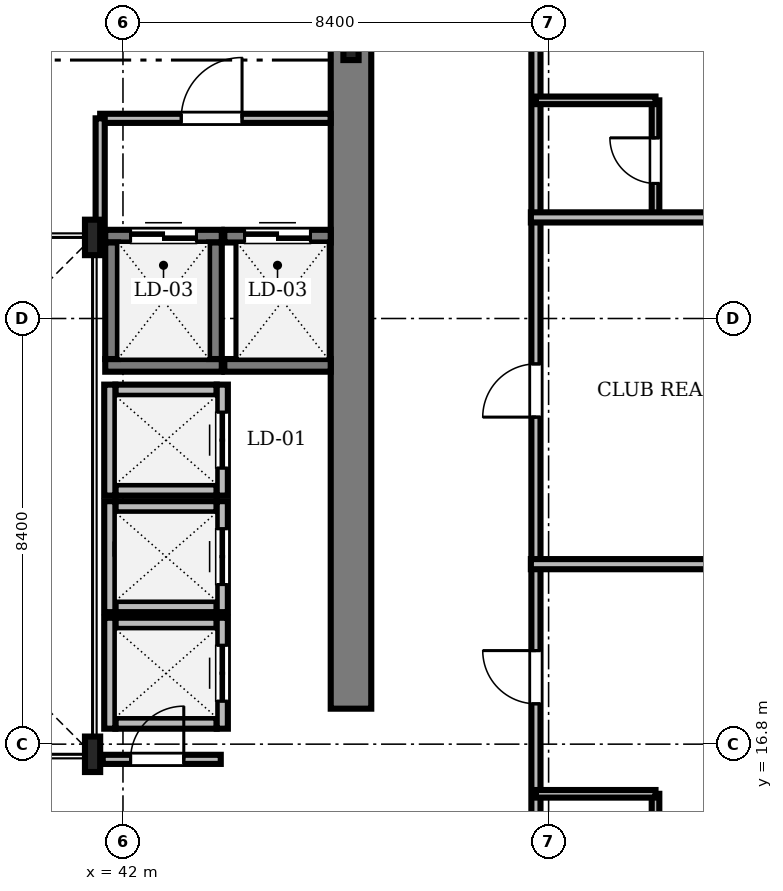
"""IFC4 building model, lengths in metres.
Left out: names, types, materials, properties, quantities, classifications, styles, units other than length and angle.
Written with IfcOpenShell. Run it as: python <this file> out.ifc"""

import sys

from ifc_helpers import new_model, si_unit, direction, frame, frame_2d, origin, origin_2d, place, context, subcontext, project, spatial, rectangle, i_section, extrude, source, transform, mapped, element, fill, save


model = new_model("IFC4")
c1 = context("Model", 3, precision=1e-05, world=origin(), true_north=direction((0.0, 1.0)))
c2 = subcontext(c1, "Body", "Model", "MODEL_VIEW")
j1 = project(units=[si_unit("LENGTHUNIT", "METRE"), si_unit("PLANEANGLEUNIT", "RADIAN")], contexts=[c1])
p1 = place(None, origin())
s1 = spatial("IfcSite", under=j1, at=p1, CompositionType="ELEMENT")
p2 = place(p1, origin())
s2 = spatial("IfcBuilding", under=s1, at=p2, CompositionType="ELEMENT")
p3 = place(p2, frame((0.0, 0.0, 181.0)))
s3 = spatial("IfcBuildingStorey", under=s2, at=p3, CompositionType="ELEMENT", Elevation=181.0)
m1 = source(origin(), c2, "Body", "SweptSolid", [
    extrude(rectangle(XDim=13.15, YDim=0.8, at=frame_2d((6.575, 0.0))), origin(), (0.0, 0.0, 1.0), 3.58),
])
p4 = place(p3, frame((46.5, 17.5, 0.0), z_axis=(0.0, 0.0, 1.0), x_axis=(0.0, 1.0, 0.0)))
e1 = element("IfcWall", 1, at=p4, inside=s3, PredefinedType="SHEAR", context=c2, shape_type="MappedRepresentation", body=[
    mapped(m1, transform((0.0, 0.0, 0.0), scale=1.0)),
])
m2 = source(origin(), c2, "Body", "SweptSolid", [
    extrude(i_section(OverallWidth=0.3, OverallDepth=0.7, WebThickness=0.017, FlangeThickness=0.032, FilletRadius=0.027, at=origin_2d()), origin(), (0.0, 0.0, 1.0), 3.58),
])
for number, where, z_axis, x_axis in (
    (2, (41.4, 16.6, 0.0), (0.0, 0.0, 1.0), (1.0, 0.0, 0.0)),
    (3, (41.4, 26.8, 0.0), (0.0, 0.0, 1.0), (1.0, 0.0, 0.0)),
    (4, (46.5, 30.65, 0.0), (0.0, 0.0, 1.0), (1.0, 0.0, 0.0)),
):
    element("IfcColumn", number, at=place(p3, frame(where, z_axis=z_axis, x_axis=x_axis)), inside=s3, PredefinedType="COLUMN", context=c2, shape_type="MappedRepresentation", body=[
        mapped(m2, transform((0.0, 0.0, 0.0), scale=1.0)),
    ])
m3 = source(origin(), c2, "Body", "SweptSolid", [
    extrude(rectangle(XDim=2.0, YDim=0.22, at=frame_2d((1.0, 0.0))), origin(), (0.0, 0.0, 1.0), 3.58),
])
for number, where, z_axis, x_axis in (
    (5, (41.85, 21.815, 0.0), (0.0, 0.0, 1.0), (1.0, 0.0, 0.0)),
    (6, (41.85, 23.785, 0.0), (0.0, 0.0, 1.0), (1.0, 0.0, 0.0)),
):
    element("IfcWall", number, at=place(p3, frame(where, z_axis=z_axis, x_axis=x_axis)), inside=s3, PredefinedType="SOLIDWALL", context=c2, shape_type="MappedRepresentation", body=[
        mapped(m3, transform((0.0, 0.0, 0.0), scale=1.0)),
    ])
m4 = source(origin(), c2, "Body", "SweptSolid", [
    extrude(rectangle(XDim=2.19, YDim=0.22, at=frame_2d((1.095, 0.0))), origin(), (0.0, 0.0, 1.0), 3.58),
])
p5 = place(p3, frame((41.74, 21.705, 0.0), z_axis=(0.0, 0.0, 1.0), x_axis=(0.0, 1.0, 0.0)))
e7 = element("IfcWall", 7, at=p5, inside=s3, PredefinedType="SOLIDWALL", context=c2, shape_type="MappedRepresentation", body=[
    mapped(m4, transform((0.0, 0.0, 0.0), scale=1.0)),
])
p6 = place(p3, frame((43.96, 21.705, 0.0), z_axis=(0.0, 0.0, 1.0), x_axis=(0.0, 1.0, 0.0)))
e8 = element("IfcWall", 8, at=p6, inside=s3, PredefinedType="SOLIDWALL", context=c2, shape_type="MappedRepresentation", body=[
    mapped(m4, transform((0.0, 0.0, 0.0), scale=1.0)),
])
m5 = source(origin(), c2, "Body", "SweptSolid", [
    extrude(rectangle(XDim=1.1, YDim=2.2, at=frame_2d((0.55, 1.1))), frame((0.0, 0.12, 0.0), z_axis=(0.0, -1.0, 0.0), x_axis=(1.0, 0.0, 0.0)), (0.0, 0.0, 1.0), 0.24),
])
p7 = place(p6, frame((0.545, 0.0, 0.0)))
e9 = element("IfcOpeningElement", 9, at=p7, cuts=e8, PredefinedType="OPENING", context=c2, shape_type="MappedRepresentation", body=[
    mapped(m5, transform((0.0, 0.0, 0.0), scale=1.0)),
])
for number, where, z_axis, x_axis in (
    (10, (41.85, 19.515, 0.0), (0.0, 0.0, 1.0), (1.0, 0.0, 0.0)),
    (11, (41.85, 21.485, 0.0), (0.0, 0.0, 1.0), (1.0, 0.0, 0.0)),
):
    element("IfcWall", number, at=place(p3, frame(where, z_axis=z_axis, x_axis=x_axis)), inside=s3, PredefinedType="SOLIDWALL", context=c2, shape_type="MappedRepresentation", body=[
        mapped(m3, transform((0.0, 0.0, 0.0), scale=1.0)),
    ])
p8 = place(p3, frame((41.74, 19.405, 0.0), z_axis=(0.0, 0.0, 1.0), x_axis=(0.0, 1.0, 0.0)))
e12 = element("IfcWall", 12, at=p8, inside=s3, PredefinedType="SOLIDWALL", context=c2, shape_type="MappedRepresentation", body=[
    mapped(m4, transform((0.0, 0.0, 0.0), scale=1.0)),
])
p9 = place(p3, frame((43.96, 19.405, 0.0), z_axis=(0.0, 0.0, 1.0), x_axis=(0.0, 1.0, 0.0)))
e13 = element("IfcWall", 13, at=p9, inside=s3, PredefinedType="SOLIDWALL", context=c2, shape_type="MappedRepresentation", body=[
    mapped(m4, transform((0.0, 0.0, 0.0), scale=1.0)),
])
p10 = place(p9, frame((0.545, 0.0, 0.0)))
e14 = element("IfcOpeningElement", 14, at=p10, cuts=e13, PredefinedType="OPENING", context=c2, shape_type="MappedRepresentation", body=[
    mapped(m5, transform((0.0, 0.0, 0.0), scale=1.0)),
])
for number, where, z_axis, x_axis in (
    (15, (41.85, 17.215, 0.0), (0.0, 0.0, 1.0), (1.0, 0.0, 0.0)),
    (16, (41.85, 19.185, 0.0), (0.0, 0.0, 1.0), (1.0, 0.0, 0.0)),
):
    element("IfcWall", number, at=place(p3, frame(where, z_axis=z_axis, x_axis=x_axis)), inside=s3, PredefinedType="SOLIDWALL", context=c2, shape_type="MappedRepresentation", body=[
        mapped(m3, transform((0.0, 0.0, 0.0), scale=1.0)),
    ])
p11 = place(p3, frame((41.74, 17.105, 0.0), z_axis=(0.0, 0.0, 1.0), x_axis=(0.0, 1.0, 0.0)))
e17 = element("IfcWall", 17, at=p11, inside=s3, PredefinedType="SOLIDWALL", context=c2, shape_type="MappedRepresentation", body=[
    mapped(m4, transform((0.0, 0.0, 0.0), scale=1.0)),
])
p12 = place(p3, frame((43.96, 17.105, 0.0), z_axis=(0.0, 0.0, 1.0), x_axis=(0.0, 1.0, 0.0)))
e18 = element("IfcWall", 18, at=p12, inside=s3, PredefinedType="SOLIDWALL", context=c2, shape_type="MappedRepresentation", body=[
    mapped(m4, transform((0.0, 0.0, 0.0), scale=1.0)),
])
p13 = place(p12, frame((0.545, 0.0, 0.0)))
e19 = element("IfcOpeningElement", 19, at=p13, cuts=e18, PredefinedType="OPENING", context=c2, shape_type="MappedRepresentation", body=[
    mapped(m5, transform((0.0, 0.0, 0.0), scale=1.0)),
])
m6 = source(origin(), c2, "Body", "SweptSolid", [
    extrude(rectangle(XDim=2.3, YDim=0.25, at=frame_2d((1.15, 0.0))), origin(), (0.0, 0.0, 1.0), 3.58),
])
p14 = place(p3, frame((41.65, 24.275, 0.0), z_axis=(0.0, 0.0, 1.0), x_axis=(1.0, 0.0, 0.0)))
e20 = element("IfcWall", 20, at=p14, inside=s3, PredefinedType="SOLIDWALL", context=c2, shape_type="MappedRepresentation", body=[
    mapped(m6, transform((0.0, 0.0, 0.0), scale=1.0)),
])
p15 = place(p3, frame((41.65, 26.825, 0.0), z_axis=(0.0, 0.0, 1.0), x_axis=(1.0, 0.0, 0.0)))
e21 = element("IfcWall", 21, at=p15, inside=s3, PredefinedType="SOLIDWALL", context=c2, shape_type="MappedRepresentation", body=[
    mapped(m6, transform((0.0, 0.0, 0.0), scale=1.0)),
])
m7 = source(origin(), c2, "Body", "SweptSolid", [
    extrude(rectangle(XDim=1.3, YDim=2.3, at=frame_2d((0.65, 1.15))), frame((0.0, 0.135, 0.0), z_axis=(0.0, -1.0, 0.0), x_axis=(1.0, 0.0, 0.0)), (0.0, 0.0, 1.0), 0.27),
])
p16 = place(p15, frame((0.5, 0.0, 0.0)))
e22 = element("IfcOpeningElement", 22, at=p16, cuts=e21, PredefinedType="OPENING", context=c2, shape_type="MappedRepresentation", body=[
    mapped(m7, transform((0.0, 0.0, 0.0), scale=1.0)),
])
for number, where, z_axis, x_axis in (
    (23, (41.775, 24.4, 0.0), (0.0, 0.0, 1.0), (0.0, 1.0, 0.0)),
    (24, (43.825, 24.4, 0.0), (0.0, 0.0, 1.0), (0.0, 1.0, 0.0)),
):
    element("IfcWall", number, at=place(p3, frame(where, z_axis=z_axis, x_axis=x_axis)), inside=s3, PredefinedType="SOLIDWALL", context=c2, shape_type="MappedRepresentation", body=[
        mapped(m6, transform((0.0, 0.0, 0.0), scale=1.0)),
    ])
m8 = source(origin(), c2, "Body", "SweptSolid", [
    extrude(rectangle(XDim=2.1, YDim=0.25, at=frame_2d((1.05, 0.0))), origin(), (0.0, 0.0, 1.0), 3.58),
])
p17 = place(p3, frame((44.0, 24.275, 0.0), z_axis=(0.0, 0.0, 1.0), x_axis=(1.0, 0.0, 0.0)))
e25 = element("IfcWall", 25, at=p17, inside=s3, PredefinedType="SOLIDWALL", context=c2, shape_type="MappedRepresentation", body=[
    mapped(m8, transform((0.0, 0.0, 0.0), scale=1.0)),
])
p18 = place(p3, frame((44.0, 26.825, 0.0), z_axis=(0.0, 0.0, 1.0), x_axis=(1.0, 0.0, 0.0)))
e26 = element("IfcWall", 26, at=p18, inside=s3, PredefinedType="SOLIDWALL", context=c2, shape_type="MappedRepresentation", body=[
    mapped(m8, transform((0.0, 0.0, 0.0), scale=1.0)),
])
p19 = place(p18, frame((0.4, 0.0, 0.0)))
e27 = element("IfcOpeningElement", 27, at=p19, cuts=e26, PredefinedType="OPENING", context=c2, shape_type="MappedRepresentation", body=[
    mapped(m7, transform((0.0, 0.0, 0.0), scale=1.0)),
])
m9 = source(origin(), c2, "Body", "SweptSolid", [
    extrude(rectangle(XDim=27.59, YDim=0.18, at=frame_2d((13.795, 0.0))), origin(), (0.0, 0.0, 1.0), 3.022),
])
p20 = place(p3, frame((50.15, 13.51, 0.0), z_axis=(0.0, 0.0, 1.0), x_axis=(0.0, 1.0, 0.0)))
e28 = element("IfcWall", 28, at=p20, inside=s3, PredefinedType="PARTITIONING", context=c2, shape_type="MappedRepresentation", body=[
    mapped(m9, transform((0.0, 0.0, 0.0), scale=1.0)),
])
m10 = source(origin(), c2, "Body", "SweptSolid", [
    extrude(rectangle(XDim=1.05, YDim=2.2, at=frame_2d((0.525, 1.1))), frame((0.0, 0.1, 0.0), z_axis=(0.0, -1.0, 0.0), x_axis=(1.0, 0.0, 0.0)), (0.0, 0.0, 1.0), 0.2),
])
p21 = place(p20, frame((4.086, 0.0, 0.0)))
e29 = element("IfcOpeningElement", 29, at=p21, cuts=e28, PredefinedType="OPENING", context=c2, shape_type="MappedRepresentation", body=[
    mapped(m10, transform((0.0, 0.0, 0.0), scale=1.0)),
])
p22 = place(p20, frame((9.744, 0.0, 0.0)))
e30 = element("IfcOpeningElement", 30, at=p22, cuts=e28, PredefinedType="OPENING", context=c2, shape_type="MappedRepresentation", body=[
    mapped(m10, transform((0.0, 0.0, 0.0), scale=1.0)),
])
p23 = place(p20, frame((17.771, 0.0, 0.0)))
e31 = element("IfcOpeningElement", 31, at=p23, cuts=e28, PredefinedType="OPENING", context=c2, shape_type="MappedRepresentation", body=[
    mapped(m10, transform((0.0, 0.0, 0.0), scale=1.0)),
])
p24 = place(p20, frame((24.614, 0.0, 0.0)))
e32 = element("IfcOpeningElement", 32, at=p24, cuts=e28, PredefinedType="OPENING", context=c2, shape_type="MappedRepresentation", body=[
    mapped(m10, transform((0.0, 0.0, 0.0), scale=1.0)),
])
m11 = source(origin(), c2, "Body", "SweptSolid", [
    extrude(rectangle(XDim=4.548, YDim=0.18, at=frame_2d((2.274, 0.0))), origin(), (0.0, 0.0, 1.0), 3.212),
])
p25 = place(p3, frame((41.55, 29.15, 0.0), z_axis=(0.0, 0.0, 1.0), x_axis=(1.0, 0.0, 0.0)))
e33 = element("IfcWall", 33, at=p25, inside=s3, PredefinedType="PARTITIONING", context=c2, shape_type="MappedRepresentation", body=[
    mapped(m11, transform((0.0, 0.0, 0.0), scale=1.0)),
])
m12 = source(origin(), c2, "Body", "SweptSolid", [
    extrude(rectangle(XDim=1.2, YDim=2.2, at=frame_2d((0.6, 1.1))), frame((0.0, 0.1, 0.0), z_axis=(0.0, -1.0, 0.0), x_axis=(1.0, 0.0, 0.0)), (0.0, 0.0, 1.0), 0.2),
])
p26 = place(p25, frame((1.6, 0.0, 0.0)))
e34 = element("IfcOpeningElement", 34, at=p26, cuts=e33, PredefinedType="OPENING", context=c2, shape_type="MappedRepresentation", body=[
    mapped(m12, transform((0.0, 0.0, 0.0), scale=1.0)),
])
m13 = source(origin(), c2, "Body", "SweptSolid", [
    extrude(rectangle(XDim=2.33, YDim=0.18, at=frame_2d((1.165, 0.0))), origin(), (0.0, 0.0, 1.0), 3.022),
])
p27 = place(p3, frame((41.6, 16.5, 0.0), z_axis=(0.0, 0.0, 1.0), x_axis=(1.0, 0.0, 0.0)))
e35 = element("IfcWall", 35, at=p27, inside=s3, PredefinedType="PARTITIONING", context=c2, shape_type="MappedRepresentation", body=[
    mapped(m13, transform((0.0, 0.0, 0.0), scale=1.0)),
])
p28 = place(p27, frame((0.55, 0.0, 0.0)))
e36 = element("IfcOpeningElement", 36, at=p28, cuts=e35, PredefinedType="OPENING", context=c2, shape_type="MappedRepresentation", body=[
    mapped(m10, transform((0.0, 0.0, 0.0), scale=1.0)),
])
m14 = source(origin(), c2, "Body", "SweptSolid", [
    extrude(rectangle(XDim=2.29, YDim=0.15, at=frame_2d((1.145, 0.0))), origin(), (0.0, 0.0, 1.0), 3.022),
])
p29 = place(p3, frame((52.51, 13.53, 0.0), z_axis=(0.0, 0.0, 1.0), x_axis=(0.0, 1.0, 0.0)))
e37 = element("IfcWall", 37, at=p29, inside=s3, PredefinedType="PARTITIONING", context=c2, shape_type="MappedRepresentation", body=[
    mapped(m14, transform((0.0, 0.0, 0.0), scale=1.0)),
])
m15 = source(origin(), c2, "Body", "SweptSolid", [
    extrude(rectangle(XDim=0.9, YDim=2.1, at=frame_2d((0.45, 1.05))), frame((0.0, 0.085, 0.0), z_axis=(0.0, -1.0, 0.0), x_axis=(1.0, 0.0, 0.0)), (0.0, 0.0, 1.0), 0.17),
])
p30 = place(p29, frame((0.65, 0.0, 0.0)))
e38 = element("IfcOpeningElement", 38, at=p30, cuts=e37, PredefinedType="OPENING", context=c2, shape_type="MappedRepresentation", body=[
    mapped(m15, transform((0.0, 0.0, 0.0), scale=1.0)),
])
m16 = source(origin(), c2, "Body", "SweptSolid", [
    extrude(rectangle(XDim=2.29, YDim=0.15, at=frame_2d((1.145, 0.0))), origin(), (0.0, 0.0, 1.0), 3.022),
])
p31 = place(p3, frame((52.51, 27.215, 0.0), z_axis=(0.0, 0.0, 1.0), x_axis=(0.0, 1.0, 0.0)))
e39 = element("IfcWall", 39, at=p31, inside=s3, PredefinedType="PARTITIONING", context=c2, shape_type="MappedRepresentation", body=[
    mapped(m16, transform((0.0, 0.0, 0.0), scale=1.0)),
])
p32 = place(p31, frame((0.65, 0.0, 0.0)))
e40 = element("IfcOpeningElement", 40, at=p32, cuts=e39, PredefinedType="OPENING", context=c2, shape_type="MappedRepresentation", body=[
    mapped(m15, transform((0.0, 0.0, 0.0), scale=1.0)),
])
m17 = source(origin(), c2, "Body", "SweptSolid", [
    extrude(rectangle(XDim=7.528, YDim=0.2, at=frame_2d((3.764, 0.0))), origin(), (0.0, 0.0, 1.0), 2.822),
])
p33 = place(p3, frame((50.05, 20.352, 0.0), z_axis=(0.0, 0.0, 1.0), x_axis=(1.0, 0.0, 0.0)))
e41 = element("IfcWall", 41, at=p33, inside=s3, PredefinedType="PARTITIONING", context=c2, shape_type="MappedRepresentation", body=[
    mapped(m17, transform((0.0, 0.0, 0.0), scale=1.0)),
])
m18 = source(origin(), c2, "Body", "SweptSolid", [
    extrude(rectangle(XDim=7.72, YDim=0.2, at=frame_2d((3.86, 0.0))), origin(), (0.0, 0.0, 1.0), 2.822),
])
p34 = place(p3, frame((50.05, 27.195, 0.0), z_axis=(0.0, 0.0, 1.0), x_axis=(1.0, 0.0, 0.0)))
e42 = element("IfcWall", 42, at=p34, inside=s3, PredefinedType="PARTITIONING", context=c2, shape_type="MappedRepresentation", body=[
    mapped(m18, transform((0.0, 0.0, 0.0), scale=1.0)),
])
m19 = source(origin(), c2, "Body", "SweptSolid", [
    extrude(rectangle(XDim=2.36, YDim=0.15, at=frame_2d((1.18, 0.0))), origin(), (0.0, 0.0, 1.0), 3.58),
])
for number, where, z_axis, x_axis in (
    (43, (50.15, 15.82, 0.0), (0.0, 0.0, 1.0), (1.0, 0.0, 0.0)),
    (44, (50.15, 29.505, 0.0), (0.0, 0.0, 1.0), (1.0, 0.0, 0.0)),
):
    element("IfcWall", number, at=place(p3, frame(where, z_axis=z_axis, x_axis=x_axis)), inside=s3, PredefinedType="PARTITIONING", context=c2, shape_type="MappedRepresentation", body=[
        mapped(m19, transform((0.0, 0.0, 0.0), scale=1.0)),
    ])
m20 = source(origin(), c2, "Body", "SweptSolid", [
    extrude(rectangle(XDim=2.35, YDim=0.18, at=frame_2d((1.175, 0.0))), origin(), (0.0, 0.0, 1.0), 3.022),
])
p35 = place(p3, frame((41.55, 26.8, 0.0), z_axis=(0.0, 0.0, 1.0), x_axis=(0.0, 1.0, 0.0)))
e45 = element("IfcWall", 45, at=p35, inside=s3, PredefinedType="PARTITIONING", context=c2, shape_type="MappedRepresentation", body=[
    mapped(m20, transform((0.0, 0.0, 0.0), scale=1.0)),
])
m21 = source(origin(), c2, "Body", "SweptSolid", [
    extrude(rectangle(XDim=1.858, YDim=0.18, at=frame_2d((0.929, 0.0))), origin(), (0.0, 0.0, 1.0), 3.58),
])
p36 = place(p3, frame((41.852, 20.65, 0.0), z_axis=(0.0, 0.0, 1.0), x_axis=(1.0, 0.0, 0.0)))
e46 = element("IfcWall", 46, at=p36, inside=s3, PredefinedType="PARTITIONING", context=c2, shape_type="MappedRepresentation", body=[
    mapped(m21, transform((0.0, 0.0, 0.0), scale=1.0)),
])
m22 = source(origin(), c2, "Body", "SweptSolid", [
    extrude(rectangle(XDim=1.1, YDim=2.2, at=frame_2d((0.55, 1.1))), frame((0.0, 0.025, 0.0), z_axis=(0.0, -1.0, 0.0), x_axis=(1.0, 0.0, 0.0)), (0.0, 0.0, 1.0), 0.05),
])
p37 = place(p7, origin())
e47 = element("IfcDoor", 47, at=p37, inside=s3, OperationType="DOUBLE_DOOR_SLIDING", PredefinedType="DOOR", context=c2, shape_type="MappedRepresentation", body=[
    mapped(m22, transform((0.0, 0.0, 0.0), scale=1.0)),
])
fill(e9, e47)
p38 = place(p10, origin())
e48 = element("IfcDoor", 48, at=p38, inside=s3, OperationType="DOUBLE_DOOR_SLIDING", PredefinedType="DOOR", context=c2, shape_type="MappedRepresentation", body=[
    mapped(m22, transform((0.0, 0.0, 0.0), scale=1.0)),
])
fill(e14, e48)
p39 = place(p13, origin())
e49 = element("IfcDoor", 49, at=p39, inside=s3, OperationType="DOUBLE_DOOR_SLIDING", PredefinedType="DOOR", context=c2, shape_type="MappedRepresentation", body=[
    mapped(m22, transform((0.0, 0.0, 0.0), scale=1.0)),
])
fill(e19, e49)
m23 = source(origin(), c2, "Body", "SweptSolid", [
    extrude(rectangle(XDim=1.3, YDim=2.3, at=frame_2d((0.65, 1.15))), frame((0.0, 0.025, 0.0), z_axis=(0.0, -1.0, 0.0), x_axis=(1.0, 0.0, 0.0)), (0.0, 0.0, 1.0), 0.05),
])
p40 = place(p16, origin())
e50 = element("IfcDoor", 50, at=p40, inside=s3, OperationType="DOUBLE_DOOR_SLIDING", PredefinedType="DOOR", context=c2, shape_type="MappedRepresentation", body=[
    mapped(m23, transform((0.0, 0.0, 0.0), scale=1.0)),
])
fill(e22, e50)
p41 = place(p19, origin())
e51 = element("IfcDoor", 51, at=p41, inside=s3, OperationType="DOUBLE_DOOR_SLIDING", PredefinedType="DOOR", context=c2, shape_type="MappedRepresentation", body=[
    mapped(m23, transform((0.0, 0.0, 0.0), scale=1.0)),
])
fill(e27, e51)
m24 = source(origin(), c2, "Body", "SweptSolid", [
    extrude(rectangle(XDim=1.05, YDim=2.2, at=frame_2d((0.525, 1.1))), frame((0.0, 0.025, 0.0), z_axis=(0.0, -1.0, 0.0), x_axis=(1.0, 0.0, 0.0)), (0.0, 0.0, 1.0), 0.05),
])
p42 = place(p21, origin())
e52 = element("IfcDoor", 52, at=p42, inside=s3, OperationType="SINGLE_SWING_RIGHT", PredefinedType="DOOR", context=c2, shape_type="MappedRepresentation", body=[
    mapped(m24, transform((0.0, 0.0, 0.0), scale=1.0)),
])
fill(e29, e52)
p43 = place(p22, origin())
e53 = element("IfcDoor", 53, at=p43, inside=s3, OperationType="SINGLE_SWING_LEFT", PredefinedType="DOOR", context=c2, shape_type="MappedRepresentation", body=[
    mapped(m24, transform((0.0, 0.0, 0.0), scale=1.0)),
])
fill(e30, e53)
m25 = source(origin(), c2, "Body", "SweptSolid", [
    extrude(rectangle(XDim=1.2, YDim=2.2, at=frame_2d((0.6, 1.1))), frame((0.0, 0.025, 0.0), z_axis=(0.0, -1.0, 0.0), x_axis=(1.0, 0.0, 0.0)), (0.0, 0.0, 1.0), 0.05),
])
p44 = place(p26, origin())
e54 = element("IfcDoor", 54, at=p44, inside=s3, OperationType="SINGLE_SWING_RIGHT", PredefinedType="DOOR", context=c2, shape_type="MappedRepresentation", body=[
    mapped(m25, transform((0.0, 0.0, 0.0), scale=1.0)),
])
fill(e34, e54)
p45 = place(p28, origin())
e55 = element("IfcDoor", 55, at=p45, inside=s3, OperationType="SINGLE_SWING_RIGHT", PredefinedType="DOOR", context=c2, shape_type="MappedRepresentation", body=[
    mapped(m24, transform((0.0, 0.0, 0.0), scale=1.0)),
])
fill(e36, e55)
m26 = source(origin(), c2, "Body", "SweptSolid", [
    extrude(rectangle(XDim=0.9, YDim=2.1, at=frame_2d((0.45, 1.05))), frame((0.0, 0.025, 0.0), z_axis=(0.0, -1.0, 0.0), x_axis=(1.0, 0.0, 0.0)), (0.0, 0.0, 1.0), 0.05),
])
p46 = place(p32, origin())
e56 = element("IfcDoor", 56, at=p46, inside=s3, OperationType="SINGLE_SWING_RIGHT", PredefinedType="DOOR", context=c2, shape_type="MappedRepresentation", body=[
    mapped(m26, transform((0.0, 0.0, 0.0), scale=1.0)),
])
fill(e40, e56)
save(model, sys.argv[1])
